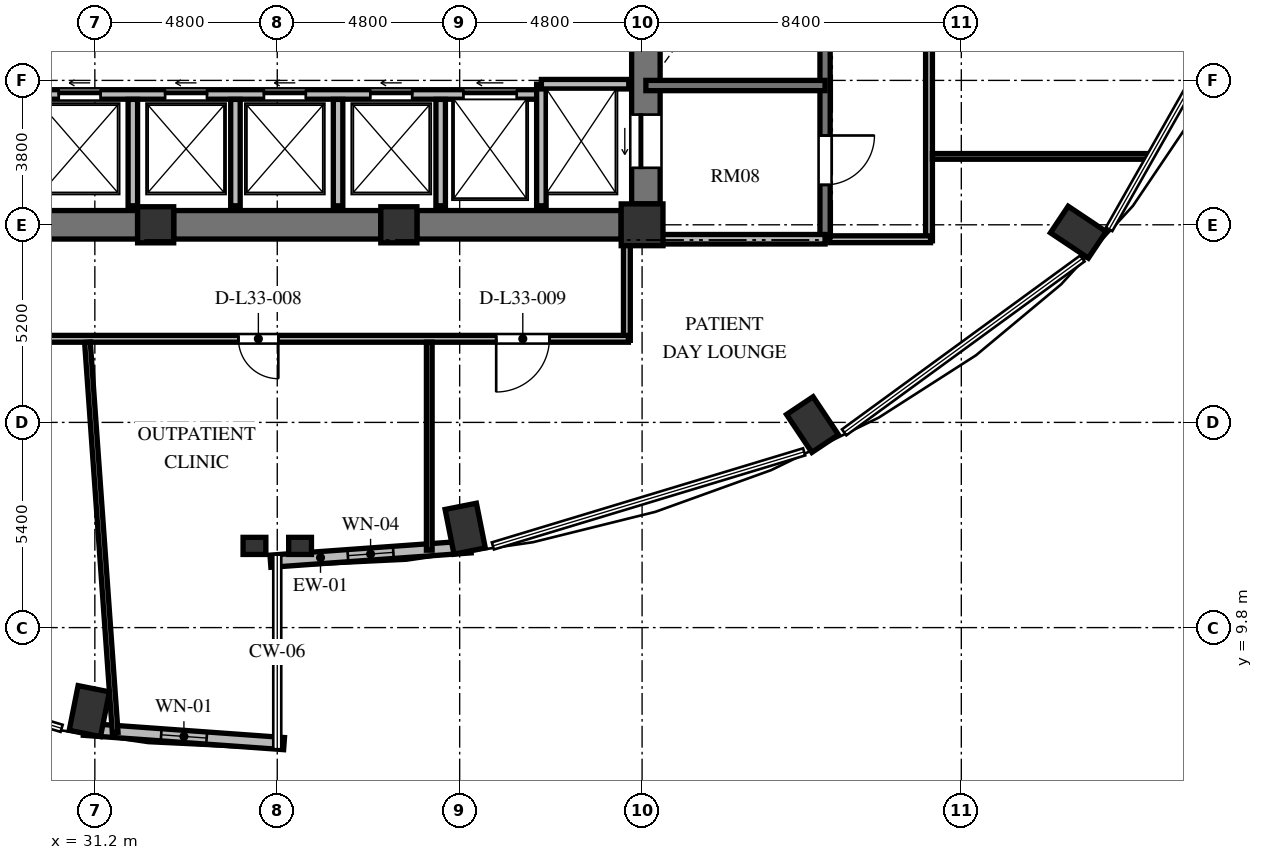
"""IFC4 building model, lengths in metres.
Left out: names, types, materials, properties, quantities, classifications, styles, units other than length and angle.
Written with IfcOpenShell. Run it as: python <this file> out.ifc"""

import sys

from ifc_helpers import new_model, si_unit, direction, frame, frame_2d, origin, origin_2d, place, context, subcontext, project, spatial, rectangle, extrude, element, fill, save


model = new_model("IFC4")
c1 = context("Model", 3, precision=1e-05, world=origin(), true_north=direction((0.0, 1.0)))
c2 = subcontext(c1, "Body", "Model", "MODEL_VIEW")
j1 = project(units=[si_unit("LENGTHUNIT", "METRE"), si_unit("PLANEANGLEUNIT", "RADIAN")], contexts=[c1])
p1 = place(None, origin())
s1 = spatial("IfcSite", under=j1, at=p1, CompositionType="ELEMENT")
p2 = place(p1, origin())
s2 = spatial("IfcBuilding", under=s1, at=p2, CompositionType="ELEMENT")
p3 = place(p2, frame((0.0, 0.0, 129.168)))
s3 = spatial("IfcBuildingStorey", under=s2, at=p3, CompositionType="ELEMENT", Elevation=129.168)
for number, where, z_axis, x_axis in (
    (1, (40.946, 12.403, 0.0), (0.0, 0.0, 1.0), (0.195, -0.981, 0.0)),
    (2, (50.084, 15.143, 0.0), (0.0, 0.0, 1.0), (0.556, -0.831, 0.0)),
    (3, (57.078, 20.205, 0.0), (0.0, 0.0, 1.0), (0.831, -0.556, 0.0)),
    (4, (31.054, 7.603, 0.0), (0.0, 0.0, 1.0), (-0.195, -0.981, 0.0)),
):
    element("IfcColumn", number, at=place(p3, frame(where, z_axis=z_axis, x_axis=x_axis)), inside=s3, PredefinedType="COLUMN", context=c2, shape_type="SweptSolid", body=[
        extrude(rectangle(XDim=1.2, YDim=0.84, at=origin_2d()), origin(), (0.0, 0.0, 1.0), 3.648),
    ])
for number, where, z_axis, x_axis in (
    (5, (32.8, 20.4, 0.0), (0.0, 0.0, 1.0), (1.0, 0.0, 0.0)),
    (6, (39.2, 20.4, 0.0), (0.0, 0.0, 1.0), (1.0, 0.0, 0.0)),
):
    element("IfcColumn", number, at=place(p3, frame(where, z_axis=z_axis, x_axis=x_axis)), inside=s3, PredefinedType="COLUMN", context=c2, shape_type="SweptSolid", body=[
        extrude(rectangle(XDim=0.95, YDim=0.95, at=origin_2d()), origin(), (0.0, 0.0, 1.0), 3.648),
    ])
p4 = place(p3, frame((45.6, 20.4, 0.0), z_axis=(0.0, 0.0, 1.0), x_axis=(1.0, 0.0, 0.0)))
e7 = element("IfcColumn", 7, at=p4, inside=s3, PredefinedType="COLUMN", context=c2, shape_type="SweptSolid", body=[
    extrude(rectangle(XDim=1.1, YDim=1.1, at=origin_2d()), origin(), (0.0, 0.0, 1.0), 3.648),
])
for number, where, z_axis, x_axis in (
    (8, (35.4, 11.95, 0.0), (0.0, 0.0, 1.0), (1.0, 0.0, 0.0)),
    (9, (36.6, 11.95, 0.0), (0.0, 0.0, 1.0), (1.0, 0.0, 0.0)),
):
    element("IfcColumn", number, at=place(p3, frame(where, z_axis=z_axis, x_axis=x_axis)), inside=s3, PredefinedType="PILASTER", context=c2, shape_type="SweptSolid", body=[
        extrude(rectangle(XDim=0.6, YDim=0.45, at=origin_2d()), origin(), (0.0, 0.0, 1.0), 3.648),
    ])
p5 = place(p3, frame((45.7, 20.95, 0.0), z_axis=(0.0, 0.0, 1.0), x_axis=(0.0, 1.0, 0.0)))
e10 = element("IfcWall", 10, at=p5, inside=s3, PredefinedType="SHEAR", context=c2, shape_type="SweptSolid", body=[
    extrude(rectangle(XDim=14.1, YDim=0.75, at=frame_2d((7.05, 0.0))), origin(), (0.0, 0.0, 1.0), 3.648),
])
p6 = place(p5, frame((11.75, 0.0, 0.0)))
e11 = element("IfcOpeningElement", 11, at=p6, cuts=e10, PredefinedType="OPENING", context=c2, shape_type="SweptSolid", body=[
    extrude(rectangle(XDim=1.4, YDim=2.3, at=frame_2d((0.7, 1.15))), frame((0.0, 0.385, 0.0), z_axis=(0.0, -1.0, 0.0), x_axis=(1.0, 0.0, 0.0)), (0.0, 0.0, 1.0), 0.77),
])
p7 = place(p5, frame((0.95, 0.0, 0.0)))
e12 = element("IfcOpeningElement", 12, at=p7, cuts=e10, PredefinedType="OPENING", context=c2, shape_type="SweptSolid", body=[
    extrude(rectangle(XDim=1.4, YDim=2.3, at=frame_2d((0.7, 1.15))), frame((0.0, 0.385, 0.0), z_axis=(0.0, -1.0, 0.0), x_axis=(1.0, 0.0, 0.0)), (0.0, 0.0, 1.0), 0.77),
])
p8 = place(p3, frame((26.95, 20.4, 0.0), z_axis=(0.0, 0.0, 1.0), x_axis=(1.0, 0.0, 0.0)))
e13 = element("IfcWall", 13, at=p8, inside=s3, PredefinedType="SHEAR", context=c2, shape_type="SweptSolid", body=[
    extrude(rectangle(XDim=5.375, YDim=0.75, at=frame_2d((2.688, 0.0))), origin(), (0.0, 0.0, 1.0), 3.648),
])
p9 = place(p3, frame((33.275, 20.4, 0.0), z_axis=(0.0, 0.0, 1.0), x_axis=(1.0, 0.0, 0.0)))
e14 = element("IfcWall", 14, at=p9, inside=s3, PredefinedType="SHEAR", context=c2, shape_type="SweptSolid", body=[
    extrude(rectangle(XDim=5.45, YDim=0.75, at=frame_2d((2.725, 0.0))), origin(), (0.0, 0.0, 1.0), 3.648),
])
p10 = place(p3, frame((39.675, 20.4, 0.0), z_axis=(0.0, 0.0, 1.0), x_axis=(1.0, 0.0, 0.0)))
e15 = element("IfcWall", 15, at=p10, inside=s3, PredefinedType="SHEAR", context=c2, shape_type="SweptSolid", body=[
    extrude(rectangle(XDim=5.375, YDim=0.75, at=frame_2d((2.688, 0.0))), origin(), (0.0, 0.0, 1.0), 3.648),
])
p11 = place(p3, frame((35.821, 11.547, 0.0), z_axis=(0.0, 0.0, 1.0), x_axis=(0.997432364291, 0.071614793619, 0.0)))
e16 = element("IfcWall", 16, at=p11, inside=s3, PredefinedType="SOLIDWALL", context=c2, shape_type="SweptSolid", body=[
    extrude(rectangle(XDim=5.284, YDim=0.32, at=frame_2d((2.642, 0.0))), origin(), (0.0, 0.0, 1.0), 3.198),
])
p12 = place(p11, frame((2.042, 0.0, 0.85)))
e17 = element("IfcOpeningElement", 17, at=p12, cuts=e16, PredefinedType="OPENING", context=c2, shape_type="SweptSolid", body=[
    extrude(rectangle(XDim=1.2, YDim=1.8, at=frame_2d((0.6, 0.9))), frame((0.0, 0.17, 0.0), z_axis=(0.0, -1.0, 0.0), x_axis=(1.0, 0.0, 0.0)), (0.0, 0.0, 1.0), 0.34),
])
p13 = place(p3, frame((30.909, 7.125, 0.0), z_axis=(0.0, 0.0, 1.0), x_axis=(0.997431890304, -0.071621394884, 0.0)))
e18 = element("IfcWall", 18, at=p13, inside=s3, PredefinedType="SOLIDWALL", context=c2, shape_type="SweptSolid", body=[
    extrude(rectangle(XDim=5.284, YDim=0.32, at=frame_2d((2.642, 0.0))), origin(), (0.0, 0.0, 1.0), 3.198),
])
p14 = place(p13, frame((2.042, 0.0, 0.85)))
e19 = element("IfcOpeningElement", 19, at=p14, cuts=e18, PredefinedType="OPENING", context=c2, shape_type="SweptSolid", body=[
    extrude(rectangle(XDim=1.2, YDim=2.2, at=frame_2d((0.6, 1.1))), frame((0.0, 0.17, 0.0), z_axis=(0.0, -1.0, 0.0), x_axis=(1.0, 0.0, 0.0)), (0.0, 0.0, 1.0), 0.34),
])
p15 = place(p3, frame((26.75, 23.83, 0.0), z_axis=(0.0, 0.0, 1.0), x_axis=(1.0, 0.0, 0.0)))
e20 = element("IfcWall", 20, at=p15, inside=s3, PredefinedType="SOLIDWALL", context=c2, shape_type="SweptSolid", body=[
    extrude(rectangle(XDim=16.2, YDim=0.25, at=frame_2d((8.1, 0.0))), origin(), (0.0, 0.0, 1.0), 3.198),
])
p16 = place(p15, frame((0.9, 0.0, 0.0)))
e21 = element("IfcOpeningElement", 21, at=p16, cuts=e20, PredefinedType="OPENING", context=c2, shape_type="SweptSolid", body=[
    extrude(rectangle(XDim=1.1, YDim=2.2, at=frame_2d((0.55, 1.1))), frame((0.0, 0.135, 0.0), z_axis=(0.0, -1.0, 0.0), x_axis=(1.0, 0.0, 0.0)), (0.0, 0.0, 1.0), 0.27),
])
p17 = place(p15, frame((3.5, 0.0, 0.0)))
e22 = element("IfcOpeningElement", 22, at=p17, cuts=e20, PredefinedType="OPENING", context=c2, shape_type="SweptSolid", body=[
    extrude(rectangle(XDim=1.1, YDim=2.2, at=frame_2d((0.55, 1.1))), frame((0.0, 0.135, 0.0), z_axis=(0.0, -1.0, 0.0), x_axis=(1.0, 0.0, 0.0)), (0.0, 0.0, 1.0), 0.27),
])
p18 = place(p15, frame((6.3, 0.0, 0.0)))
e23 = element("IfcOpeningElement", 23, at=p18, cuts=e20, PredefinedType="OPENING", context=c2, shape_type="SweptSolid", body=[
    extrude(rectangle(XDim=1.1, YDim=2.2, at=frame_2d((0.55, 1.1))), frame((0.0, 0.135, 0.0), z_axis=(0.0, -1.0, 0.0), x_axis=(1.0, 0.0, 0.0)), (0.0, 0.0, 1.0), 0.27),
])
p19 = place(p15, frame((8.9, 0.0, 0.0)))
e24 = element("IfcOpeningElement", 24, at=p19, cuts=e20, PredefinedType="OPENING", context=c2, shape_type="SweptSolid", body=[
    extrude(rectangle(XDim=1.1, YDim=2.2, at=frame_2d((0.55, 1.1))), frame((0.0, 0.135, 0.0), z_axis=(0.0, -1.0, 0.0), x_axis=(1.0, 0.0, 0.0)), (0.0, 0.0, 1.0), 0.27),
])
p20 = place(p15, frame((11.7, 0.0, 0.0)))
e25 = element("IfcOpeningElement", 25, at=p20, cuts=e20, PredefinedType="OPENING", context=c2, shape_type="SweptSolid", body=[
    extrude(rectangle(XDim=1.1, YDim=2.2, at=frame_2d((0.55, 1.1))), frame((0.0, 0.135, 0.0), z_axis=(0.0, -1.0, 0.0), x_axis=(1.0, 0.0, 0.0)), (0.0, 0.0, 1.0), 0.27),
])
p21 = place(p15, frame((14.15, 0.0, 0.0)))
e26 = element("IfcOpeningElement", 26, at=p21, cuts=e20, PredefinedType="OPENING", context=c2, shape_type="SweptSolid", body=[
    extrude(rectangle(XDim=1.4, YDim=2.3, at=frame_2d((0.7, 1.15))), frame((0.0, 0.135, 0.0), z_axis=(0.0, -1.0, 0.0), x_axis=(1.0, 0.0, 0.0)), (0.0, 0.0, 1.0), 0.27),
])
p22 = place(p3, frame((42.95, 20.9, 0.0), z_axis=(0.0, 0.0, 1.0), x_axis=(0.0, 1.0, 0.0)))
e27 = element("IfcWall", 27, at=p22, inside=s3, PredefinedType="SOLIDWALL", context=c2, shape_type="SweptSolid", body=[
    extrude(rectangle(XDim=3.2, YDim=0.25, at=frame_2d((1.6, 0.0))), origin(), (0.0, 0.0, 1.0), 3.198),
])
p23 = place(p3, frame((42.95, 24.1, 0.0), z_axis=(0.0, 0.0, 1.0), x_axis=(1.0, 0.0, 0.0)))
e28 = element("IfcWall", 28, at=p23, inside=s3, PredefinedType="SOLIDWALL", context=c2, shape_type="SweptSolid", body=[
    extrude(rectangle(XDim=2.3, YDim=0.25, at=frame_2d((1.15, 0.0))), origin(), (0.0, 0.0, 1.0), 3.198),
])
for number, where, z_axis, x_axis in (
    (29, (32.2, 20.9, 0.0), (0.0, 0.0, 1.0), (0.0, 1.0, 0.0)),
    (30, (34.9, 20.9, 0.0), (0.0, 0.0, 1.0), (0.0, 1.0, 0.0)),
    (31, (37.6, 20.9, 0.0), (0.0, 0.0, 1.0), (0.0, 1.0, 0.0)),
    (32, (40.3, 20.9, 0.0), (0.0, 0.0, 1.0), (0.0, 1.0, 0.0)),
):
    element("IfcWall", number, at=place(p3, frame(where, z_axis=z_axis, x_axis=x_axis)), inside=s3, PredefinedType="SOLIDWALL", context=c2, shape_type="SweptSolid", body=[
        extrude(rectangle(XDim=2.8, YDim=0.25, at=frame_2d((1.4, 0.0))), origin(), (0.0, 0.0, 1.0), 3.198),
    ])
p24 = place(p3, frame((50.415, 35.845, 0.0), z_axis=(0.0, 0.0, 1.0), x_axis=(0.0, -1.0, 0.0)))
e33 = element("IfcWall", 33, at=p24, inside=s3, PredefinedType="SHEAR", context=c2, shape_type="SweptSolid", body=[
    extrude(rectangle(XDim=15.825, YDim=0.27, at=frame_2d((7.913, 0.0))), origin(), (0.0, 0.0, 1.0), 3.648),
])
p25 = place(p24, frame((4.445, 0.0, 0.0)))
e34 = element("IfcOpeningElement", 34, at=p25, cuts=e33, PredefinedType="OPENING", context=c2, shape_type="SweptSolid", body=[
    extrude(rectangle(XDim=1.2, YDim=2.15, at=frame_2d((0.6, 1.075))), frame((0.0, 0.145, 0.0), z_axis=(0.0, -1.0, 0.0), x_axis=(1.0, 0.0, 0.0)), (0.0, 0.0, 1.0), 0.29),
])
p26 = place(p24, frame((1.295, 0.0, 0.0)))
e35 = element("IfcOpeningElement", 35, at=p26, cuts=e33, PredefinedType="OPENING", context=c2, shape_type="SweptSolid", body=[
    extrude(rectangle(XDim=1.3, YDim=2.2, at=frame_2d((0.65, 1.1))), frame((0.0, 0.145, 0.0), z_axis=(0.0, -1.0, 0.0), x_axis=(1.0, 0.0, 0.0)), (0.0, 0.0, 1.0), 0.29),
])
p27 = place(p24, frame((13.095, 0.0, 0.0)))
e36 = element("IfcOpeningElement", 36, at=p27, cuts=e33, PredefinedType="OPENING", context=c2, shape_type="SweptSolid", body=[
    extrude(rectangle(XDim=1.3, YDim=2.2, at=frame_2d((0.65, 1.1))), frame((0.0, 0.145, 0.0), z_axis=(0.0, -1.0, 0.0), x_axis=(1.0, 0.0, 0.0)), (0.0, 0.0, 1.0), 0.29),
])
p28 = place(p3, frame((45.7, 24.065, 0.0), z_axis=(0.0, 0.0, 1.0), x_axis=(1.0, 0.0, 0.0)))
e37 = element("IfcWall", 37, at=p28, inside=s3, PredefinedType="SHEAR", context=c2, shape_type="SweptSolid", body=[
    extrude(rectangle(XDim=4.715, YDim=0.27, at=frame_2d((2.357, 0.0))), origin(), (0.0, 0.0, 1.0), 3.648),
])
p29 = place(p3, frame((45.7, 20.02, 0.0), z_axis=(0.0, 0.0, 1.0), x_axis=(1.0, 0.0, 0.0)))
e38 = element("IfcWall", 38, at=p29, inside=s3, PredefinedType="SOLIDWALL", context=c2, shape_type="SweptSolid", body=[
    extrude(rectangle(XDim=4.715, YDim=0.25, at=frame_2d((2.357, 0.0))), origin(), (0.0, 0.0, 1.0), 3.198),
])
p30 = place(p3, frame((53.15, 26.64, 0.0), z_axis=(0.0, 0.0, 1.0), x_axis=(0.0, -1.0, 0.0)))
e39 = element("IfcWall", 39, at=p30, inside=s3, PredefinedType="PARTITIONING", context=c2, shape_type="SweptSolid", body=[
    extrude(rectangle(XDim=6.66, YDim=0.18, at=frame_2d((3.33, 0.0))), origin(), (0.0, 0.0, 1.0), 3.198),
])
p31 = place(p3, frame((53.19, 20.02, 0.0), z_axis=(0.0, 0.0, 1.0), x_axis=(-1.0, 0.0, 0.0)))
e40 = element("IfcWall", 40, at=p31, inside=s3, PredefinedType="PARTITIONING", context=c2, shape_type="SweptSolid", body=[
    extrude(rectangle(XDim=2.65, YDim=0.18, at=frame_2d((1.325, 0.0))), origin(), (0.0, 0.0, 1.0), 3.198),
])
p32 = place(p3, frame((45.2, 19.91, 0.0), z_axis=(0.0, 0.0, 1.0), x_axis=(0.0, -1.0, 0.0)))
e41 = element("IfcWall", 41, at=p32, inside=s3, PredefinedType="PARTITIONING", context=c2, shape_type="SweptSolid", body=[
    extrude(rectangle(XDim=2.55, YDim=0.18, at=frame_2d((1.275, 0.0))), origin(), (0.0, 0.0, 1.0), 3.198),
])
p33 = place(p3, frame((45.24, 17.4, 0.0), z_axis=(0.0, 0.0, 1.0), x_axis=(-1.0, 0.0, 0.0)))
e42 = element("IfcWall", 42, at=p33, inside=s3, PredefinedType="PARTITIONING", context=c2, shape_type="SweptSolid", body=[
    extrude(rectangle(XDim=21.93, YDim=0.18, at=frame_2d((10.965, 0.0))), origin(), (0.0, 0.0, 1.0), 2.823),
])
p34 = place(p33, frame((17.223, 0.0, 0.0)))
e43 = element("IfcOpeningElement", 43, at=p34, cuts=e42, PredefinedType="OPENING", context=c2, shape_type="SweptSolid", body=[
    extrude(rectangle(XDim=1.4, YDim=2.2, at=frame_2d((0.7, 1.1))), frame((0.0, 0.1, 0.0), z_axis=(0.0, -1.0, 0.0), x_axis=(1.0, 0.0, 0.0)), (0.0, 0.0, 1.0), 0.2),
])
p35 = place(p33, frame((9.212, 0.0, 0.0)))
e44 = element("IfcOpeningElement", 44, at=p35, cuts=e42, PredefinedType="OPENING", context=c2, shape_type="SweptSolid", body=[
    extrude(rectangle(XDim=1.05, YDim=2.15, at=frame_2d((0.525, 1.075))), frame((0.0, 0.1, 0.0), z_axis=(0.0, -1.0, 0.0), x_axis=(1.0, 0.0, 0.0)), (0.0, 0.0, 1.0), 0.2),
])
p36 = place(p33, frame((2.079, 0.0, 0.0)))
e45 = element("IfcOpeningElement", 45, at=p36, cuts=e42, PredefinedType="OPENING", context=c2, shape_type="SweptSolid", body=[
    extrude(rectangle(XDim=1.4, YDim=2.2, at=frame_2d((0.7, 1.1))), frame((0.0, 0.1, 0.0), z_axis=(0.0, -1.0, 0.0), x_axis=(1.0, 0.0, 0.0)), (0.0, 0.0, 1.0), 0.2),
])
p37 = place(p3, frame((53.24, 22.2, 0.0), z_axis=(0.0, 0.0, 1.0), x_axis=(1.0, 0.0, 0.0)))
e46 = element("IfcWall", 46, at=p37, inside=s3, PredefinedType="PARTITIONING", context=c2, shape_type="SweptSolid", body=[
    extrude(rectangle(XDim=5.731, YDim=0.15, at=frame_2d((2.866, 0.0))), origin(), (0.0, 0.0, 1.0), 3.198),
])
p38 = place(p3, frame((31.735, 7.038, 0.0), z_axis=(0.0, 0.0, 1.0), x_axis=(-0.070862904564, 0.997486064442, 0.0)))
e47 = element("IfcWall", 47, at=p38, inside=s3, PredefinedType="PARTITIONING", context=c2, shape_type="SweptSolid", body=[
    extrude(rectangle(XDim=10.298, YDim=0.15, at=frame_2d((5.149, 0.0))), origin(), (0.0, 0.0, 1.0), 2.583),
])
p39 = place(p3, frame((40.0, 11.837, 0.0), z_axis=(0.0, 0.0, 1.0), x_axis=(0.0, 1.0, 0.0)))
e48 = element("IfcWall", 48, at=p39, inside=s3, PredefinedType="PARTITIONING", context=c2, shape_type="SweptSolid", body=[
    extrude(rectangle(XDim=5.473, YDim=0.15, at=frame_2d((2.736, 0.0))), origin(), (0.0, 0.0, 1.0), 2.583),
])
p40 = place(p12, origin())
e49 = element("IfcWindow", 49, at=p40, inside=s3, PartitioningType="SINGLE_PANEL", PredefinedType="WINDOW", context=c2, shape_type="SweptSolid", body=[
    extrude(rectangle(XDim=1.2, YDim=1.8, at=frame_2d((0.6, 0.9))), frame((0.0, 0.03, 0.0), z_axis=(0.0, -1.0, 0.0), x_axis=(1.0, 0.0, 0.0)), (0.0, 0.0, 1.0), 0.06),
])
fill(e17, e49)
p41 = place(p14, origin())
e50 = element("IfcWindow", 50, at=p41, inside=s3, PartitioningType="SINGLE_PANEL", PredefinedType="WINDOW", context=c2, shape_type="SweptSolid", body=[
    extrude(rectangle(XDim=1.2, YDim=2.2, at=frame_2d((0.6, 1.1))), frame((0.0, 0.03, 0.0), z_axis=(0.0, -1.0, 0.0), x_axis=(1.0, 0.0, 0.0)), (0.0, 0.0, 1.0), 0.06),
])
fill(e19, e50)
p42 = place(p17, origin())
e51 = element("IfcDoor", 51, at=p42, inside=s3, OperationType="SLIDING_TO_LEFT", PredefinedType="DOOR", context=c2, shape_type="SweptSolid", body=[
    extrude(rectangle(XDim=1.1, YDim=2.2, at=frame_2d((0.55, 1.1))), frame((0.0, 0.025, 0.0), z_axis=(0.0, -1.0, 0.0), x_axis=(1.0, 0.0, 0.0)), (0.0, 0.0, 1.0), 0.05),
])
fill(e22, e51)
p43 = place(p18, origin())
e52 = element("IfcDoor", 52, at=p43, inside=s3, OperationType="SLIDING_TO_LEFT", PredefinedType="DOOR", context=c2, shape_type="SweptSolid", body=[
    extrude(rectangle(XDim=1.1, YDim=2.2, at=frame_2d((0.55, 1.1))), frame((0.0, 0.025, 0.0), z_axis=(0.0, -1.0, 0.0), x_axis=(1.0, 0.0, 0.0)), (0.0, 0.0, 1.0), 0.05),
])
fill(e23, e52)
p44 = place(p19, origin())
e53 = element("IfcDoor", 53, at=p44, inside=s3, OperationType="SLIDING_TO_LEFT", PredefinedType="DOOR", context=c2, shape_type="SweptSolid", body=[
    extrude(rectangle(XDim=1.1, YDim=2.2, at=frame_2d((0.55, 1.1))), frame((0.0, 0.025, 0.0), z_axis=(0.0, -1.0, 0.0), x_axis=(1.0, 0.0, 0.0)), (0.0, 0.0, 1.0), 0.05),
])
fill(e24, e53)
p45 = place(p20, origin())
e54 = element("IfcDoor", 54, at=p45, inside=s3, OperationType="SLIDING_TO_LEFT", PredefinedType="DOOR", context=c2, shape_type="SweptSolid", body=[
    extrude(rectangle(XDim=1.1, YDim=2.2, at=frame_2d((0.55, 1.1))), frame((0.0, 0.025, 0.0), z_axis=(0.0, -1.0, 0.0), x_axis=(1.0, 0.0, 0.0)), (0.0, 0.0, 1.0), 0.05),
])
fill(e25, e54)
p46 = place(p7, origin())
e55 = element("IfcDoor", 55, at=p46, inside=s3, OperationType="SLIDING_TO_LEFT", PredefinedType="DOOR", context=c2, shape_type="SweptSolid", body=[
    extrude(rectangle(XDim=1.4, YDim=2.3, at=frame_2d((0.7, 1.15))), frame((0.0, 0.025, 0.0), z_axis=(0.0, -1.0, 0.0), x_axis=(1.0, 0.0, 0.0)), (0.0, 0.0, 1.0), 0.05),
])
fill(e12, e55)
p47 = place(p21, origin())
e56 = element("IfcDoor", 56, at=p47, inside=s3, OperationType="SLIDING_TO_LEFT", PredefinedType="DOOR", context=c2, shape_type="SweptSolid", body=[
    extrude(rectangle(XDim=1.4, YDim=2.3, at=frame_2d((0.7, 1.15))), frame((0.0, 0.025, 0.0), z_axis=(0.0, -1.0, 0.0), x_axis=(1.0, 0.0, 0.0)), (0.0, 0.0, 1.0), 0.05),
])
fill(e26, e56)
p48 = place(p27, origin())
e57 = element("IfcDoor", 57, at=p48, inside=s3, OperationType="SINGLE_SWING_LEFT", PredefinedType="DOOR", context=c2, shape_type="SweptSolid", body=[
    extrude(rectangle(XDim=1.3, YDim=2.2, at=frame_2d((0.65, 1.1))), frame((0.0, 0.025, 0.0), z_axis=(0.0, -1.0, 0.0), x_axis=(1.0, 0.0, 0.0)), (0.0, 0.0, 1.0), 0.05),
])
fill(e36, e57)
p49 = place(p35, origin())
e58 = element("IfcDoor", 58, at=p49, inside=s3, OperationType="SINGLE_SWING_LEFT", PredefinedType="DOOR", context=c2, shape_type="SweptSolid", body=[
    extrude(rectangle(XDim=1.05, YDim=2.15, at=frame_2d((0.525, 1.075))), frame((0.0, 0.025, 0.0), z_axis=(0.0, -1.0, 0.0), x_axis=(1.0, 0.0, 0.0)), (0.0, 0.0, 1.0), 0.05),
])
fill(e44, e58)
p50 = place(p36, origin())
e59 = element("IfcDoor", 59, at=p50, inside=s3, OperationType="SINGLE_SWING_RIGHT", PredefinedType="DOOR", context=c2, shape_type="SweptSolid", body=[
    extrude(rectangle(XDim=1.4, YDim=2.2, at=frame_2d((0.7, 1.1))), frame((0.0, 0.025, 0.0), z_axis=(0.0, -1.0, 0.0), x_axis=(1.0, 0.0, 0.0)), (0.0, 0.0, 1.0), 0.05),
])
fill(e45, e59)
save(model, sys.argv[1])
